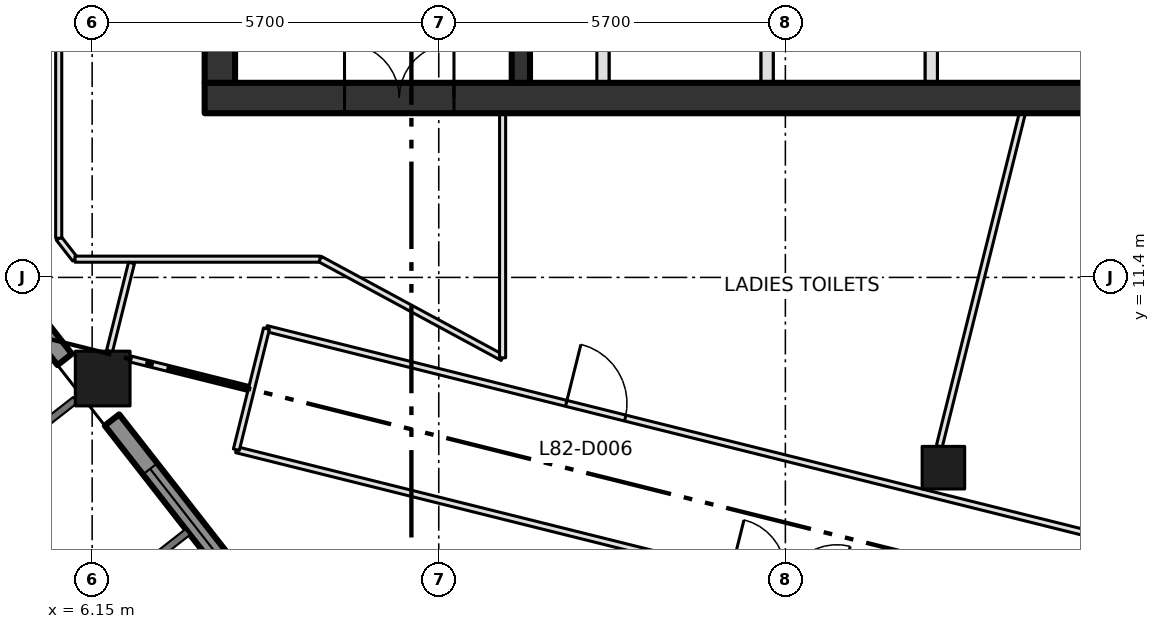
"""IFC4 building model, lengths in metres.
Left out: names, types, materials, properties, quantities, classifications, styles, units other than length and angle.
Written with IfcOpenShell. Run it as: python <this file> out.ifc"""

import sys

from ifc_helpers import new_model, si_unit, direction, frame, frame_2d, origin, origin_2d, place, context, subcontext, project, spatial, rectangle, extrude, element, fill, save


model = new_model("IFC4")
c1 = context("Model", 3, precision=1e-05, world=origin(), true_north=direction((0.0, 1.0)))
c2 = subcontext(c1, "Body", "Model", "MODEL_VIEW")
j1 = project(units=[si_unit("LENGTHUNIT", "METRE"), si_unit("PLANEANGLEUNIT", "RADIAN")], contexts=[c1])
p1 = place(None, origin())
s1 = spatial("IfcSite", under=j1, at=p1, CompositionType="ELEMENT")
p2 = place(p1, origin())
s2 = spatial("IfcBuilding", under=s1, at=p2, CompositionType="ELEMENT")
p3 = place(p2, frame((0.0, 0.0, 358.2)))
s3 = spatial("IfcBuildingStorey", under=s2, at=p3, CompositionType="ELEMENT", Elevation=358.2)
p4 = place(p3, frame((6.323, 9.737, 0.0), z_axis=(0.0, 0.0, 1.0), x_axis=(1.0, 0.0, 0.0)))
e1 = element("IfcColumn", 1, at=p4, inside=s3, PredefinedType="COLUMN", context=c2, shape_type="SweptSolid", body=[
    extrude(rectangle(XDim=0.9, YDim=0.9, at=origin_2d()), origin(), (0.0, 0.0, 1.0), 4.2),
])
p5 = place(p3, frame((20.149, 8.271, 0.0), z_axis=(0.0, 0.0, 1.0), x_axis=(1.0, 0.0, 0.0)))
e2 = element("IfcColumn", 2, at=p5, inside=s3, PredefinedType="COLUMN", context=c2, shape_type="SweptSolid", body=[
    extrude(rectangle(XDim=0.7, YDim=0.7, at=origin_2d()), origin(), (0.0, 0.0, 1.0), 4.2),
])
p6 = place(p3, frame((8.0, 14.35, -0.3), z_axis=(0.0, 0.0, 1.0), x_axis=(1.0, 0.0, 0.0)))
e3 = element("IfcWall", 3, at=p6, inside=s3, PredefinedType="SHEAR", context=c2, shape_type="SweptSolid", body=[
    extrude(rectangle(XDim=22.8, YDim=0.5, at=frame_2d((11.4, 0.0))), origin(), (0.0, 0.0, 1.0), 4.2),
])
p7 = place(p6, frame((2.3, 0.0, 0.3)))
e4 = element("IfcOpeningElement", 4, at=p7, cuts=e3, PredefinedType="OPENING", context=c2, shape_type="SweptSolid", body=[
    extrude(rectangle(XDim=1.8, YDim=2.1, at=frame_2d((0.9, 1.05))), frame((0.0, 0.26, 0.0), z_axis=(0.0, -1.0, 0.0), x_axis=(1.0, 0.0, 0.0)), (0.0, 0.0, 1.0), 0.52),
])
p8 = place(p3, frame((8.25, 14.6, -0.3), z_axis=(0.0, 0.0, 1.0), x_axis=(0.0, 1.0, 0.0)))
e5 = element("IfcWall", 5, at=p8, inside=s3, PredefinedType="SHEAR", context=c2, shape_type="SweptSolid", body=[
    extrude(rectangle(XDim=21.1, YDim=0.5, at=frame_2d((10.55, 0.0))), origin(), (0.0, 0.0, 1.0), 4.2),
])
p9 = place(p3, frame((13.2, 14.6, 0.0), z_axis=(0.0, 0.0, 1.0), x_axis=(0.0, 1.0, 0.0)))
e6 = element("IfcWall", 6, at=p9, inside=s3, PredefinedType="SHEAR", context=c2, shape_type="SweptSolid", body=[
    extrude(rectangle(XDim=21.1, YDim=0.3, at=frame_2d((10.55, 0.0))), origin(), (0.0, 0.0, 1.0), 3.9),
])
p10 = place(p9, frame((3.7, 0.0, 0.0)))
e7 = element("IfcOpeningElement", 7, at=p10, cuts=e6, PredefinedType="OPENING", context=c2, shape_type="SweptSolid", body=[
    extrude(rectangle(XDim=1.8, YDim=2.1, at=frame_2d((0.9, 1.05))), frame((0.0, 0.16, 0.0), z_axis=(0.0, -1.0, 0.0), x_axis=(1.0, 0.0, 0.0)), (0.0, 0.0, 1.0), 0.32),
])
p11 = place(p9, frame((11.8, 0.0, 0.0)))
e8 = element("IfcOpeningElement", 8, at=p11, cuts=e6, PredefinedType="OPENING", context=c2, shape_type="SweptSolid", body=[
    extrude(rectangle(XDim=1.2, YDim=2.1, at=frame_2d((0.6, 1.05))), frame((0.0, 0.16, 0.0), z_axis=(0.0, -1.0, 0.0), x_axis=(1.0, 0.0, 0.0)), (0.0, 0.0, 1.0), 0.32),
])
for number, where, z_axis, x_axis in (
    (9, (14.55, 14.6, 0.0), (0.0, 0.0, 1.0), (0.0, 1.0, 0.0)),
    (10, (17.25, 14.6, 0.0), (0.0, 0.0, 1.0), (0.0, 1.0, 0.0)),
    (11, (19.95, 14.6, 0.0), (0.0, 0.0, 1.0), (0.0, 1.0, 0.0)),
):
    element("IfcWall", number, at=place(p3, frame(where, z_axis=z_axis, x_axis=x_axis)), inside=s3, PredefinedType="SOLIDWALL", context=c2, shape_type="SweptSolid", body=[
        extrude(rectangle(XDim=3.0, YDim=0.2, at=frame_2d((1.5, 0.0))), origin(), (0.0, 0.0, 1.0), 3.9),
    ])
p12 = place(p3, frame((2.967, 13.547, 0.0), z_axis=(0.0, 0.0, 1.0), x_axis=(0.615486001463, -0.788147817356, 0.0)))
e12 = element("IfcWall", 12, at=p12, inside=s3, PredefinedType="SOLIDWALL", context=c2, shape_type="SweptSolid", body=[
    extrude(rectangle(XDim=4.437, YDim=0.3, at=frame_2d((2.219, 0.0))), origin(), (0.0, 0.0, 1.0), 3.2),
])
p13 = place(p12, frame((1.018, 0.0, 0.8)))
e13 = element("IfcOpeningElement", 13, at=p13, cuts=e12, PredefinedType="OPENING", context=c2, shape_type="SweptSolid", body=[
    extrude(rectangle(XDim=2.4, YDim=2.1, at=frame_2d((1.2, 1.05))), frame((0.0, 0.16, 0.0), z_axis=(0.0, -1.0, 0.0), x_axis=(1.0, 0.0, 0.0)), (0.0, 0.0, 1.0), 0.32),
])
p14 = place(p3, frame((6.476, 9.055, 0.0), z_axis=(0.0, 0.0, 1.0), x_axis=(0.615649380255, -0.788020203162, 0.0)))
e14 = element("IfcWall", 14, at=p14, inside=s3, PredefinedType="SOLIDWALL", context=c2, shape_type="SweptSolid", body=[
    extrude(rectangle(XDim=4.438, YDim=0.3, at=frame_2d((2.219, 0.0))), origin(), (0.0, 0.0, 1.0), 3.2),
])
p15 = place(p14, frame((1.019, 0.0, 0.8)))
e15 = element("IfcOpeningElement", 15, at=p15, cuts=e14, PredefinedType="OPENING", context=c2, shape_type="SweptSolid", body=[
    extrude(rectangle(XDim=2.4, YDim=2.1, at=frame_2d((1.2, 1.05))), frame((0.0, 0.16, 0.0), z_axis=(0.0, -1.0, 0.0), x_axis=(1.0, 0.0, 0.0)), (0.0, 0.0, 1.0), 0.32),
])
p16 = place(p3, frame((5.6, 12.044, 0.0), z_axis=(0.0, 0.0, 1.0), x_axis=(0.614328236968, -0.789050579661, 0.0)))
e16 = element("IfcWall", 16, at=p16, inside=s3, PredefinedType="PARTITIONING", context=c2, shape_type="SweptSolid", body=[
    extrude(rectangle(XDim=0.436, YDim=0.1, at=frame_2d((0.218, 0.0))), origin(), (0.0, 0.0, 1.0), 3.9),
])
p17 = place(p3, frame((5.6, 39.3, 0.0), z_axis=(0.0, 0.0, 1.0), x_axis=(0.0, -1.0, 0.0)))
e17 = element("IfcWall", 17, at=p17, inside=s3, PredefinedType="PARTITIONING", context=c2, shape_type="SweptSolid", body=[
    extrude(rectangle(XDim=27.256, YDim=0.1, at=frame_2d((13.628, 0.0))), origin(), (0.0, 0.0, 1.0), 3.9),
])
p18 = place(p17, frame((17.963, 0.0, 0.0)))
e18 = element("IfcOpeningElement", 18, at=p18, cuts=e17, PredefinedType="OPENING", context=c2, shape_type="SweptSolid", body=[
    extrude(rectangle(XDim=1.0, YDim=2.1, at=frame_2d((0.5, 1.05))), frame((0.0, 0.06, 0.0), z_axis=(0.0, -1.0, 0.0), x_axis=(1.0, 0.0, 0.0)), (0.0, 0.0, 1.0), 0.12),
])
p19 = place(p3, frame((5.868, 11.7, 0.0), z_axis=(0.0, 0.0, 1.0), x_axis=(1.0, 0.0, 0.0)))
e19 = element("IfcWall", 19, at=p19, inside=s3, PredefinedType="PARTITIONING", context=c2, shape_type="SweptSolid", body=[
    extrude(rectangle(XDim=4.032, YDim=0.1, at=frame_2d((2.016, 0.0))), origin(), (0.0, 0.0, 1.0), 3.9),
])
p20 = place(p3, frame((8.521, 8.567, 0.0), z_axis=(0.0, 0.0, 1.0), x_axis=(0.970303035129, -0.241892579506, 0.0)))
e20 = element("IfcWall", 20, at=p20, inside=s3, PredefinedType="PARTITIONING", context=c2, shape_type="SweptSolid", body=[
    extrude(rectangle(XDim=28.5, YDim=0.1, at=frame_2d((14.25, 0.0))), origin(), (0.0, 0.0, 1.0), 3.9),
])
p21 = place(p20, frame((13.98, 0.0, 0.0)))
e21 = element("IfcOpeningElement", 21, at=p21, cuts=e20, PredefinedType="OPENING", context=c2, shape_type="SweptSolid", body=[
    extrude(rectangle(XDim=1.0, YDim=2.1, at=frame_2d((0.5, 1.05))), frame((0.0, 0.06, 0.0), z_axis=(0.0, -1.0, 0.0), x_axis=(1.0, 0.0, 0.0)), (0.0, 0.0, 1.0), 0.12),
])
p22 = place(p20, frame((8.38, 0.0, 0.0)))
e22 = element("IfcOpeningElement", 22, at=p22, cuts=e20, PredefinedType="OPENING", context=c2, shape_type="SweptSolid", body=[
    extrude(rectangle(XDim=1.8, YDim=2.1, at=frame_2d((0.9, 1.05))), frame((0.0, 0.06, 0.0), z_axis=(0.0, -1.0, 0.0), x_axis=(1.0, 0.0, 0.0)), (0.0, 0.0, 1.0), 0.12),
])
p23 = place(p3, frame((9.017, 10.558, 0.0), z_axis=(0.0, 0.0, 1.0), x_axis=(0.970286089829, -0.241960542, 0.0)))
e23 = element("IfcWall", 23, at=p23, inside=s3, PredefinedType="PARTITIONING", context=c2, shape_type="SweptSolid", body=[
    extrude(rectangle(XDim=19.879, YDim=0.1, at=frame_2d((9.94, 0.0))), origin(), (0.0, 0.0, 1.0), 3.9),
])
p24 = place(p23, frame((5.08, 0.0, 0.0)))
e24 = element("IfcOpeningElement", 24, at=p24, cuts=e23, PredefinedType="OPENING", context=c2, shape_type="SweptSolid", body=[
    extrude(rectangle(XDim=1.0, YDim=2.1, at=frame_2d((0.5, 1.05))), frame((0.0, 0.06, 0.0), z_axis=(0.0, -1.0, 0.0), x_axis=(1.0, 0.0, 0.0)), (0.0, 0.0, 1.0), 0.12),
])
p25 = place(p23, frame((15.184, 0.0, 0.0)))
e25 = element("IfcOpeningElement", 25, at=p25, cuts=e23, PredefinedType="OPENING", context=c2, shape_type="SweptSolid", body=[
    extrude(rectangle(XDim=1.0, YDim=2.1, at=frame_2d((0.5, 1.05))), frame((0.0, 0.06, 0.0), z_axis=(0.0, -1.0, 0.0), x_axis=(1.0, 0.0, 0.0)), (0.0, 0.0, 1.0), 0.12),
])
p26 = place(p3, frame((9.017, 10.558, 0.0), z_axis=(0.0, 0.0, 1.0), x_axis=(-0.241751728323, -0.970338137895, 0.0)))
e26 = element("IfcWall", 26, at=p26, inside=s3, PredefinedType="PARTITIONING", context=c2, shape_type="SweptSolid", body=[
    extrude(rectangle(XDim=2.052, YDim=0.1, at=frame_2d((1.026, 0.0))), origin(), (0.0, 0.0, 1.0), 3.9),
])
p27 = place(p3, frame((9.9, 11.7, 0.0), z_axis=(0.0, 0.0, 1.0), x_axis=(0.87965147249, -0.475618846291, 0.0)))
e27 = element("IfcWall", 27, at=p27, inside=s3, PredefinedType="PARTITIONING", context=c2, shape_type="SweptSolid", body=[
    extrude(rectangle(XDim=3.41, YDim=0.1, at=frame_2d((1.705, 0.0))), origin(), (0.0, 0.0, 1.0), 3.9),
])
p28 = place(p3, frame((12.9, 10.078, 0.0), z_axis=(0.0, 0.0, 1.0), x_axis=(0.0, 1.0, 0.0)))
e28 = element("IfcWall", 28, at=p28, inside=s3, PredefinedType="PARTITIONING", context=c2, shape_type="SweptSolid", body=[
    extrude(rectangle(XDim=4.022, YDim=0.1, at=frame_2d((2.011, 0.0))), origin(), (0.0, 0.0, 1.0), 3.9),
])
p29 = place(p3, frame((6.797, 11.638, 0.0), z_axis=(0.0, 0.0, 1.0), x_axis=(-0.242113049408, -0.970248046278, 0.0)))
e29 = element("IfcWall", 29, at=p29, inside=s3, PredefinedType="PARTITIONING", context=c2, shape_type="SweptSolid", body=[
    extrude(rectangle(XDim=1.495, YDim=0.1, at=frame_2d((0.748, 0.0))), origin(), (0.0, 0.0, 1.0), 3.9),
])
p30 = place(p3, frame((8.72, 9.574, 0.0), z_axis=(0.0, 0.0, 1.0), x_axis=(-0.970221168815, 0.24222073318, 0.0)))
e30 = element("IfcWall", 30, at=p30, inside=s3, PredefinedType="PARTITIONING", context=c2, shape_type="SweptSolid", body=[
    extrude(rectangle(XDim=2.007, YDim=0.1, at=frame_2d((1.003, 0.0))), origin(), (0.0, 0.0, 1.0), 3.9),
])
p31 = place(p3, frame((20.081, 8.621, 0.0), z_axis=(0.0, 0.0, 1.0), x_axis=(0.241904838353, 0.970299978966, 0.0)))
e31 = element("IfcWall", 31, at=p31, inside=s3, PredefinedType="PARTITIONING", context=c2, shape_type="SweptSolid", body=[
    extrude(rectangle(XDim=5.647, YDim=0.1, at=frame_2d((2.823, 0.0))), origin(), (0.0, 0.0, 1.0), 3.9),
])
p32 = place(p7, origin())
e32 = element("IfcDoor", 32, at=p32, inside=s3, OperationType="DOUBLE_DOOR_SINGLE_SWING", PredefinedType="DOOR", context=c2, shape_type="SweptSolid", body=[
    extrude(rectangle(XDim=1.8, YDim=2.1, at=frame_2d((0.9, 1.05))), frame((0.0, 0.025, 0.0), z_axis=(0.0, -1.0, 0.0), x_axis=(1.0, 0.0, 0.0)), (0.0, 0.0, 1.0), 0.05),
])
fill(e4, e32)
p33 = place(p15, origin())
e33 = element("IfcWindow", 33, at=p33, inside=s3, PartitioningType="DOUBLE_PANEL_VERTICAL", PredefinedType="WINDOW", context=c2, shape_type="SweptSolid", body=[
    extrude(rectangle(XDim=2.4, YDim=2.1, at=frame_2d((1.2, 1.05))), frame((0.0, 0.03, 0.0), z_axis=(0.0, -1.0, 0.0), x_axis=(1.0, 0.0, 0.0)), (0.0, 0.0, 1.0), 0.06),
])
fill(e15, e33)
p34 = place(p24, origin())
e34 = element("IfcDoor", 34, at=p34, inside=s3, OperationType="SINGLE_SWING_LEFT", PredefinedType="DOOR", context=c2, shape_type="SweptSolid", body=[
    extrude(rectangle(XDim=1.0, YDim=2.1, at=frame_2d((0.5, 1.05))), frame((0.0, 0.025, 0.0), z_axis=(0.0, -1.0, 0.0), x_axis=(1.0, 0.0, 0.0)), (0.0, 0.0, 1.0), 0.05),
])
fill(e24, e34)
save(model, sys.argv[1])
